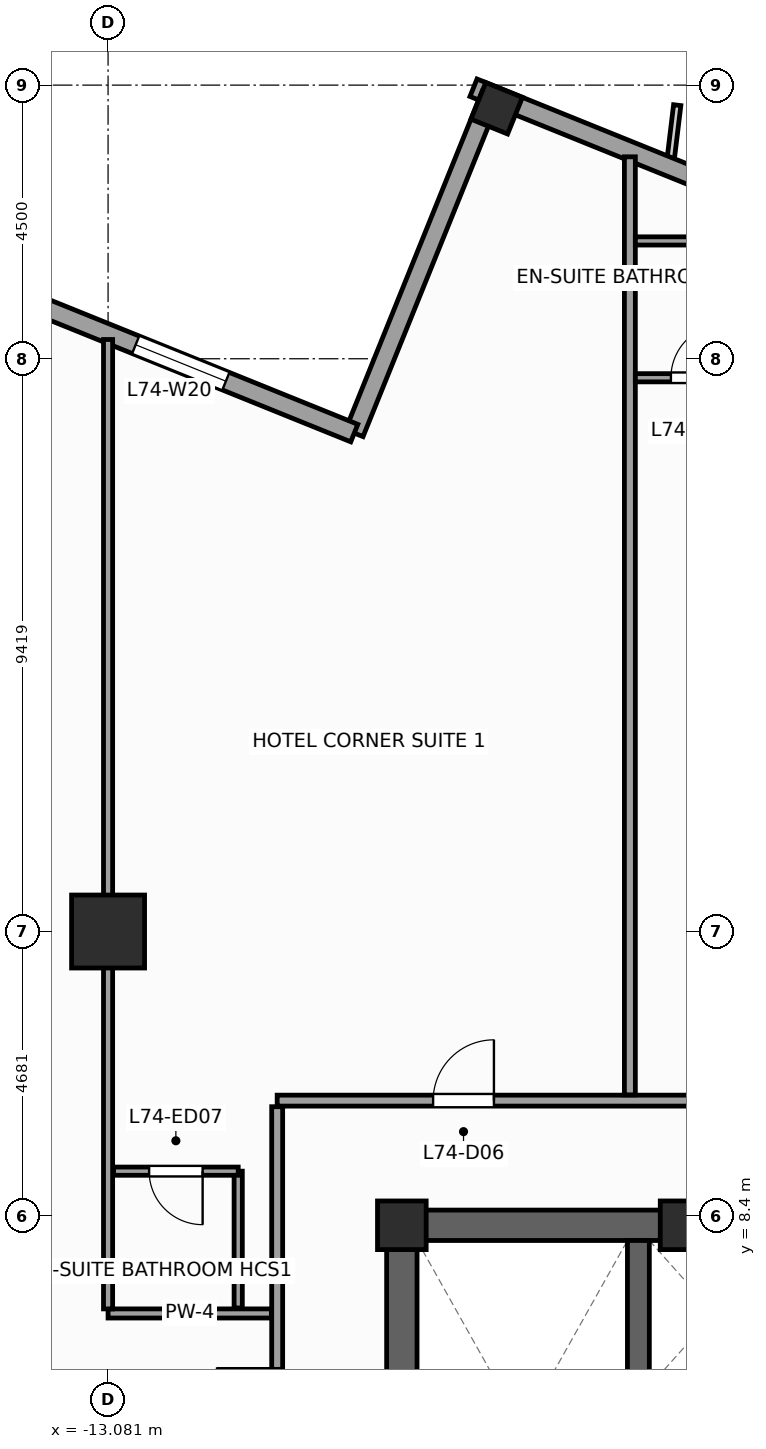
"""IFC4 building model, lengths in metres.
Left out: names, types, materials, properties, quantities, classifications, styles, units other than length and angle.
Written with IfcOpenShell. Run it as: python <this file> out.ifc"""

import sys

from ifc_helpers import new_model, si_unit, direction, frame, frame_2d, origin, origin_2d, place, context, subcontext, project, spatial, rectangle, extrude, source, transform, mapped, element, fill, save


model = new_model("IFC4")
c1 = context("Model", 3, precision=1e-05, world=origin(), true_north=direction((0.0, 1.0)))
c2 = subcontext(c1, "Body", "Model", "MODEL_VIEW")
j1 = project(units=[si_unit("LENGTHUNIT", "METRE"), si_unit("PLANEANGLEUNIT", "RADIAN")], contexts=[c1])
p1 = place(None, origin())
s1 = spatial("IfcSite", under=j1, at=p1, CompositionType="ELEMENT")
p2 = place(p1, origin())
s2 = spatial("IfcBuilding", under=s1, at=p2, CompositionType="ELEMENT")
p3 = place(p2, frame((0.0, 0.0, 301.2)))
s3 = spatial("IfcBuildingStorey", under=s2, at=p3, CompositionType="ELEMENT", Elevation=301.2)
p4 = place(p3, frame((-8.5, 8.25, 0.0), z_axis=(0.0, 0.0, 1.0), x_axis=(1.0, 0.0, 0.0)))
e1 = element("IfcWall", 1, at=p4, inside=s3, PredefinedType="SHEAR", context=c2, shape_type="SweptSolid", body=[
    extrude(rectangle(XDim=17.0, YDim=0.5, at=frame_2d((8.5, 0.0))), origin(), (0.0, 0.0, 1.0), 3.6),
])
p5 = place(p3, frame((-8.25, -8.0, 0.0), z_axis=(0.0, 0.0, 1.0), x_axis=(0.0, 1.0, 0.0)))
e2 = element("IfcWall", 2, at=p5, inside=s3, PredefinedType="SHEAR", context=c2, shape_type="SweptSolid", body=[
    extrude(rectangle(XDim=16.0, YDim=0.5, at=frame_2d((8.0, 0.0))), origin(), (0.0, 0.0, 1.0), 3.6),
])
p6 = place(p5, frame((4.69, 0.0, 0.0)))
e3 = element("IfcOpeningElement", 3, at=p6, cuts=e2, PredefinedType="OPENING", context=c2, shape_type="SweptSolid", body=[
    extrude(rectangle(XDim=1.3, YDim=2.2, at=frame_2d((0.65, 1.1))), frame((0.0, 0.26, 0.0), z_axis=(0.0, -1.0, 0.0), x_axis=(1.0, 0.0, 0.0)), (0.0, 0.0, 1.0), 0.52),
])
p7 = place(p3, frame((-4.36, -8.0, 0.0), z_axis=(0.0, 0.0, 1.0), x_axis=(0.0, 1.0, 0.0)))
e4 = element("IfcWall", 4, at=p7, inside=s3, PredefinedType="SHEAR", context=c2, shape_type="SweptSolid", body=[
    extrude(rectangle(XDim=16.0, YDim=0.36, at=frame_2d((8.0, 0.0))), origin(), (0.0, 0.0, 1.0), 3.6),
])
m1 = source(origin(), c2, "Body", "SweptSolid", [
    extrude(rectangle(XDim=0.8, YDim=0.8, at=origin_2d()), origin(), (0.0, 0.0, 1.0), 3.6),
])
for number, where, z_axis, x_axis in (
    (5, (-8.25, 8.25, 0.0), (0.0, 0.0, 1.0), (1.0, 0.0, 0.0)),
    (6, (-3.6, 8.25, 0.0), (0.0, 0.0, 1.0), (1.0, 0.0, 0.0)),
):
    element("IfcColumn", number, at=place(p3, frame(where, z_axis=z_axis, x_axis=x_axis)), inside=s3, PredefinedType="PILASTER", context=c2, shape_type="MappedRepresentation", body=[
        mapped(m1, transform((0.0, 0.0, 0.0), scale=1.0)),
    ])
m2 = source(origin(), c2, "Body", "SweptSolid", [
    extrude(rectangle(XDim=1.2, YDim=1.2, at=origin_2d()), origin(), (0.0, 0.0, 1.0), 3.6),
])
p8 = place(p3, frame((-13.081, 13.081, 0.0), z_axis=(0.0, 0.0, 1.0), x_axis=(1.0, 0.0, 0.0)))
e7 = element("IfcColumn", 7, at=p8, inside=s3, PredefinedType="COLUMN", context=c2, shape_type="MappedRepresentation", body=[
    mapped(m2, transform((0.0, 0.0, 0.0), scale=1.0)),
])
m3 = source(origin(), c2, "Body", "SweptSolid", [
    extrude(rectangle(XDim=0.65, YDim=0.65, at=origin_2d()), origin(), (0.0, 0.0, 1.0), 3.6),
])
p9 = place(p3, frame((-6.69, 26.62, 0.0), z_axis=(0.0, 0.0, 1.0), x_axis=(0.374606593416, 0.927183854567, 0.0)))
e8 = element("IfcColumn", 8, at=p9, inside=s3, PredefinedType="COLUMN", context=c2, shape_type="MappedRepresentation", body=[
    mapped(m3, transform((0.0, 0.0, 0.0), scale=1.0)),
])
p10 = place(p3, frame((23.813, 14.479, 0.0), z_axis=(0.0, 0.0, 1.0), x_axis=(-0.927182657188, 0.374609557019, 0.0)))
e9 = element("IfcWall", 9, at=p10, inside=s3, PredefinedType="STANDARD", context=c2, shape_type="SweptSolid", body=[
    extrude(rectangle(XDim=33.31, YDim=0.31, at=frame_2d((16.655, 0.0))), origin(), (0.0, 0.0, 1.0), 2.75),
])
p11 = place(p10, frame((3.197, 0.0, 0.47)))
e10 = element("IfcOpeningElement", 10, at=p11, cuts=e9, PredefinedType="OPENING", context=c2, shape_type="SweptSolid", body=[
    extrude(rectangle(XDim=1.6, YDim=2.1, at=frame_2d((0.8, 1.05))), frame((0.0, 0.165, 0.0), z_axis=(0.0, -1.0, 0.0), x_axis=(1.0, 0.0, 0.0)), (0.0, 0.0, 1.0), 0.33),
])
p12 = place(p10, frame((8.86, 0.0, 0.47)))
e11 = element("IfcOpeningElement", 11, at=p12, cuts=e9, PredefinedType="OPENING", context=c2, shape_type="SweptSolid", body=[
    extrude(rectangle(XDim=1.6, YDim=2.1, at=frame_2d((0.8, 1.05))), frame((0.0, 0.165, 0.0), z_axis=(0.0, -1.0, 0.0), x_axis=(1.0, 0.0, 0.0)), (0.0, 0.0, 1.0), 0.33),
])
p13 = place(p10, frame((14.439, 0.0, 0.47)))
e12 = element("IfcOpeningElement", 12, at=p13, cuts=e9, PredefinedType="OPENING", context=c2, shape_type="SweptSolid", body=[
    extrude(rectangle(XDim=1.6, YDim=2.1, at=frame_2d((0.8, 1.05))), frame((0.0, 0.165, 0.0), z_axis=(0.0, -1.0, 0.0), x_axis=(1.0, 0.0, 0.0)), (0.0, 0.0, 1.0), 0.33),
])
p14 = place(p10, frame((22.601, 0.0, 0.47)))
e13 = element("IfcOpeningElement", 13, at=p14, cuts=e9, PredefinedType="OPENING", context=c2, shape_type="SweptSolid", body=[
    extrude(rectangle(XDim=1.6, YDim=2.1, at=frame_2d((0.8, 1.05))), frame((0.0, 0.165, 0.0), z_axis=(0.0, -1.0, 0.0), x_axis=(1.0, 0.0, 0.0)), (0.0, 0.0, 1.0), 0.33),
])
p15 = place(p10, frame((25.597, 0.0, 0.47)))
e14 = element("IfcOpeningElement", 14, at=p15, cuts=e9, PredefinedType="OPENING", context=c2, shape_type="SweptSolid", body=[
    extrude(rectangle(XDim=1.6, YDim=2.1, at=frame_2d((0.8, 1.05))), frame((0.0, 0.165, 0.0), z_axis=(0.0, -1.0, 0.0), x_axis=(1.0, 0.0, 0.0)), (0.0, 0.0, 1.0), 0.33),
])
p16 = place(p3, frame((-6.784, 26.841, 0.0), z_axis=(0.0, 0.0, 1.0), x_axis=(-0.374636620962, -0.927171722085, 0.0)))
e15 = element("IfcWall", 15, at=p16, inside=s3, PredefinedType="STANDARD", context=c2, shape_type="SweptSolid", body=[
    extrude(rectangle(XDim=6.0, YDim=0.31, at=frame_2d((3.0, 0.0))), origin(), (0.0, 0.0, 1.0), 2.65),
])
p17 = place(p3, frame((-9.032, 21.278, 0.0), z_axis=(0.0, 0.0, 1.0), x_axis=(-0.927185411764, 0.374602739196, 0.0)))
e16 = element("IfcWall", 16, at=p17, inside=s3, PredefinedType="STANDARD", context=c2, shape_type="SweptSolid", body=[
    extrude(rectangle(XDim=6.155, YDim=0.31, at=frame_2d((3.078, 0.0))), origin(), (0.0, 0.0, 1.0), 3.35),
])
p18 = place(p17, frame((2.278, 0.0, 0.47)))
e17 = element("IfcOpeningElement", 17, at=p18, cuts=e16, PredefinedType="OPENING", context=c2, shape_type="SweptSolid", body=[
    extrude(rectangle(XDim=1.6, YDim=2.1, at=frame_2d((0.8, 1.05))), frame((0.0, 0.165, 0.0), z_axis=(0.0, -1.0, 0.0), x_axis=(1.0, 0.0, 0.0)), (0.0, 0.0, 1.0), 0.33),
])
p19 = place(p3, frame((-10.3, 10.3, 0.0), z_axis=(0.0, 0.0, 1.0), x_axis=(1.0, 0.0, 0.0)))
e18 = element("IfcWall", 18, at=p19, inside=s3, PredefinedType="PARTITIONING", context=c2, shape_type="SweptSolid", body=[
    extrude(rectangle(XDim=21.65, YDim=0.18, at=frame_2d((10.825, 0.0))), origin(), (0.0, 0.0, 1.0), 3.35),
])
p20 = place(p19, frame((2.564, 0.0, 0.0)))
e19 = element("IfcOpeningElement", 19, at=p20, cuts=e18, PredefinedType="OPENING", context=c2, shape_type="SweptSolid", body=[
    extrude(rectangle(XDim=1.0, YDim=2.15, at=frame_2d((0.5, 1.075))), frame((0.0, 0.1, 0.0), z_axis=(0.0, -1.0, 0.0), x_axis=(1.0, 0.0, 0.0)), (0.0, 0.0, 1.0), 0.2),
])
p21 = place(p19, frame((8.05, 0.0, 0.0)))
e20 = element("IfcOpeningElement", 20, at=p21, cuts=e18, PredefinedType="OPENING", context=c2, shape_type="SweptSolid", body=[
    extrude(rectangle(XDim=1.0, YDim=2.15, at=frame_2d((0.5, 1.075))), frame((0.0, 0.1, 0.0), z_axis=(0.0, -1.0, 0.0), x_axis=(1.0, 0.0, 0.0)), (0.0, 0.0, 1.0), 0.2),
])
p22 = place(p19, frame((12.54, 0.0, 0.0)))
e21 = element("IfcOpeningElement", 21, at=p22, cuts=e18, PredefinedType="OPENING", context=c2, shape_type="SweptSolid", body=[
    extrude(rectangle(XDim=1.0, YDim=2.15, at=frame_2d((0.5, 1.075))), frame((0.0, 0.1, 0.0), z_axis=(0.0, -1.0, 0.0), x_axis=(1.0, 0.0, 0.0)), (0.0, 0.0, 1.0), 0.2),
])
p23 = place(p19, frame((18.871, 0.0, 0.0)))
e22 = element("IfcOpeningElement", 22, at=p23, cuts=e18, PredefinedType="OPENING", context=c2, shape_type="SweptSolid", body=[
    extrude(rectangle(XDim=1.0, YDim=2.15, at=frame_2d((0.5, 1.075))), frame((0.0, 0.1, 0.0), z_axis=(0.0, -1.0, 0.0), x_axis=(1.0, 0.0, 0.0)), (0.0, 0.0, 1.0), 0.2),
])
p24 = place(p3, frame((-10.3, -12.35, 0.0), z_axis=(0.0, 0.0, 1.0), x_axis=(0.0, 1.0, 0.0)))
e23 = element("IfcWall", 23, at=p24, inside=s3, PredefinedType="PARTITIONING", context=c2, shape_type="SweptSolid", body=[
    extrude(rectangle(XDim=22.55, YDim=0.18, at=frame_2d((11.275, 0.0))), origin(), (0.0, 0.0, 1.0), 3.35),
])
p25 = place(p24, frame((13.95, 0.0, 0.0)))
e24 = element("IfcOpeningElement", 24, at=p25, cuts=e23, PredefinedType="OPENING", context=c2, shape_type="SweptSolid", body=[
    extrude(rectangle(XDim=1.0, YDim=2.15, at=frame_2d((0.5, 1.075))), frame((0.0, 0.1, 0.0), z_axis=(0.0, -1.0, 0.0), x_axis=(1.0, 0.0, 0.0)), (0.0, 0.0, 1.0), 0.2),
])
p26 = place(p24, frame((17.25, 0.0, 0.0)))
e25 = element("IfcOpeningElement", 25, at=p26, cuts=e23, PredefinedType="OPENING", context=c2, shape_type="SweptSolid", body=[
    extrude(rectangle(XDim=1.0, YDim=2.15, at=frame_2d((0.5, 1.075))), frame((0.0, 0.1, 0.0), z_axis=(0.0, -1.0, 0.0), x_axis=(1.0, 0.0, 0.0)), (0.0, 0.0, 1.0), 0.2),
])
p27 = place(p24, frame((6.65, 0.0, 0.0)))
e26 = element("IfcOpeningElement", 26, at=p27, cuts=e23, PredefinedType="OPENING", context=c2, shape_type="SweptSolid", body=[
    extrude(rectangle(XDim=1.0, YDim=2.15, at=frame_2d((0.5, 1.075))), frame((0.0, 0.1, 0.0), z_axis=(0.0, -1.0, 0.0), x_axis=(1.0, 0.0, 0.0)), (0.0, 0.0, 1.0), 0.2),
])
p28 = place(p24, frame((10.15, 0.0, 0.0)))
e27 = element("IfcOpeningElement", 27, at=p28, cuts=e23, PredefinedType="OPENING", context=c2, shape_type="SweptSolid", body=[
    extrude(rectangle(XDim=1.0, YDim=2.15, at=frame_2d((0.5, 1.075))), frame((0.0, 0.1, 0.0), z_axis=(0.0, -1.0, 0.0), x_axis=(1.0, 0.0, 0.0)), (0.0, 0.0, 1.0), 0.2),
])
p29 = place(p3, frame((-4.5, 10.395, 0.0), z_axis=(0.0, 0.0, 1.0), x_axis=(0.0, 1.0, 0.0)))
e28 = element("IfcWall", 28, at=p29, inside=s3, PredefinedType="PARTITIONING", context=c2, shape_type="SweptSolid", body=[
    extrude(rectangle(XDim=15.426, YDim=0.18, at=frame_2d((7.713, 0.0))), origin(), (0.0, 0.0, 1.0), 3.35),
])
p30 = place(p3, frame((-10.395, 6.8, 0.0), z_axis=(0.0, 0.0, 1.0), x_axis=(-1.0, 0.0, 0.0)))
e29 = element("IfcWall", 29, at=p30, inside=s3, PredefinedType="PARTITIONING", context=c2, shape_type="SweptSolid", body=[
    extrude(rectangle(XDim=2.686, YDim=0.15, at=frame_2d((1.343, 0.0))), origin(), (0.0, 0.0, 1.0), 3.35),
])
p31 = place(p3, frame((-13.081, 6.875, 0.0), z_axis=(0.0, 0.0, 1.0), x_axis=(0.0, 1.0, 0.0)))
e30 = element("IfcWall", 30, at=p31, inside=s3, PredefinedType="PARTITIONING", context=c2, shape_type="SweptSolid", body=[
    extrude(rectangle(XDim=15.942, YDim=0.15, at=frame_2d((7.971, 0.0))), origin(), (0.0, 0.0, 1.0), 2.45),
])
p32 = place(p3, frame((-10.941, 6.89, 0.0), z_axis=(0.0, 0.0, 1.0), x_axis=(0.0, 1.0, 0.0)))
e31 = element("IfcWall", 31, at=p32, inside=s3, PredefinedType="PARTITIONING", context=c2, shape_type="SweptSolid", body=[
    extrude(rectangle(XDim=2.25, YDim=0.135, at=frame_2d((1.125, 0.0))), origin(), (0.0, 0.0, 1.0), 3.35),
])
p33 = place(p3, frame((-12.991, 9.14, 0.0), z_axis=(0.0, 0.0, 1.0), x_axis=(1.0, 0.0, 0.0)))
e32 = element("IfcWall", 32, at=p33, inside=s3, PredefinedType="PARTITIONING", context=c2, shape_type="SweptSolid", body=[
    extrude(rectangle(XDim=2.05, YDim=0.135, at=frame_2d((1.025, 0.0))), origin(), (0.0, 0.0, 1.0), 3.35),
])
p34 = place(p33, frame((0.585, 0.0, 0.0)))
e33 = element("IfcOpeningElement", 33, at=p34, cuts=e32, PredefinedType="OPENING", context=c2, shape_type="SweptSolid", body=[
    extrude(rectangle(XDim=0.88, YDim=2.1, at=frame_2d((0.44, 1.05))), frame((0.0, 0.078, 0.0), z_axis=(0.0, -1.0, 0.0), x_axis=(1.0, 0.0, 0.0)), (0.0, 0.0, 1.0), 0.155),
])
p35 = place(p3, frame((-4.41, 22.188, 0.0), z_axis=(0.0, 0.0, 1.0), x_axis=(1.0, 0.0, 0.0)))
e34 = element("IfcWall", 34, at=p35, inside=s3, PredefinedType="PARTITIONING", context=c2, shape_type="SweptSolid", body=[
    extrude(rectangle(XDim=2.05, YDim=0.135, at=frame_2d((1.025, 0.0))), origin(), (0.0, 0.0, 1.0), 3.35),
])
p36 = place(p35, frame((0.585, 0.0, 0.0)))
e35 = element("IfcOpeningElement", 35, at=p36, cuts=e34, PredefinedType="OPENING", context=c2, shape_type="SweptSolid", body=[
    extrude(rectangle(XDim=0.88, YDim=2.1, at=frame_2d((0.44, 1.05))), frame((0.0, 0.078, 0.0), z_axis=(0.0, -1.0, 0.0), x_axis=(1.0, 0.0, 0.0)), (0.0, 0.0, 1.0), 0.155),
])
p37 = place(p3, frame((-4.41, 24.438, 0.0), z_axis=(0.0, 0.0, 1.0), x_axis=(1.0, 0.0, 0.0)))
e36 = element("IfcWall", 36, at=p37, inside=s3, PredefinedType="PARTITIONING", context=c2, shape_type="SweptSolid", body=[
    extrude(rectangle(XDim=2.05, YDim=0.135, at=frame_2d((1.025, 0.0))), origin(), (0.0, 0.0, 1.0), 3.35),
])
m4 = source(origin(), c2, "Body", "SweptSolid", [
    extrude(rectangle(XDim=1.6, YDim=2.1, at=frame_2d((0.8, 1.05))), frame((0.0, 0.03, 0.0), z_axis=(0.0, -1.0, 0.0), x_axis=(1.0, 0.0, 0.0)), (0.0, 0.0, 1.0), 0.06),
])
p38 = place(p18, origin())
e37 = element("IfcWindow", 37, at=p38, inside=s3, PartitioningType="SINGLE_PANEL", PredefinedType="WINDOW", context=c2, shape_type="MappedRepresentation", body=[
    mapped(m4, transform((0.0, 0.0, 0.0), scale=1.0)),
])
fill(e17, e37)
m5 = source(origin(), c2, "Body", "SweptSolid", [
    extrude(rectangle(XDim=1.0, YDim=2.15, at=frame_2d((0.5, 1.075))), frame((0.0, 0.025, 0.0), z_axis=(0.0, -1.0, 0.0), x_axis=(1.0, 0.0, 0.0)), (0.0, 0.0, 1.0), 0.05),
])
p39 = place(p26, origin())
e38 = element("IfcDoor", 38, at=p39, inside=s3, OperationType="SINGLE_SWING_RIGHT", PredefinedType="DOOR", context=c2, shape_type="MappedRepresentation", body=[
    mapped(m5, transform((0.0, 0.0, 0.0), scale=1.0)),
])
fill(e25, e38)
p40 = place(p20, origin())
e39 = element("IfcDoor", 39, at=p40, inside=s3, OperationType="SINGLE_SWING_RIGHT", PredefinedType="DOOR", context=c2, shape_type="MappedRepresentation", body=[
    mapped(m5, transform((0.0, 0.0, 0.0), scale=1.0)),
])
fill(e19, e39)
m6 = source(origin(), c2, "Body", "SweptSolid", [
    extrude(rectangle(XDim=0.88, YDim=2.1, at=frame_2d((0.44, 1.05))), frame((0.0, 0.025, 0.0), z_axis=(0.0, -1.0, 0.0), x_axis=(1.0, 0.0, 0.0)), (0.0, 0.0, 1.0), 0.05),
])
p41 = place(p34, frame((0.88, 0.0, 0.0), z_axis=(0.0, 0.0, 1.0), x_axis=(-1.0, 0.0, 0.0)))
e40 = element("IfcDoor", 40, at=p41, inside=s3, OperationType="SINGLE_SWING_RIGHT", PredefinedType="DOOR", context=c2, shape_type="MappedRepresentation", body=[
    mapped(m6, transform((0.0, 0.0, 0.0), scale=1.0)),
])
fill(e33, e40)
p42 = place(p36, origin())
e41 = element("IfcDoor", 41, at=p42, inside=s3, OperationType="SINGLE_SWING_RIGHT", PredefinedType="DOOR", context=c2, shape_type="MappedRepresentation", body=[
    mapped(m6, transform((0.0, 0.0, 0.0), scale=1.0)),
])
fill(e35, e41)
save(model, sys.argv[1])
